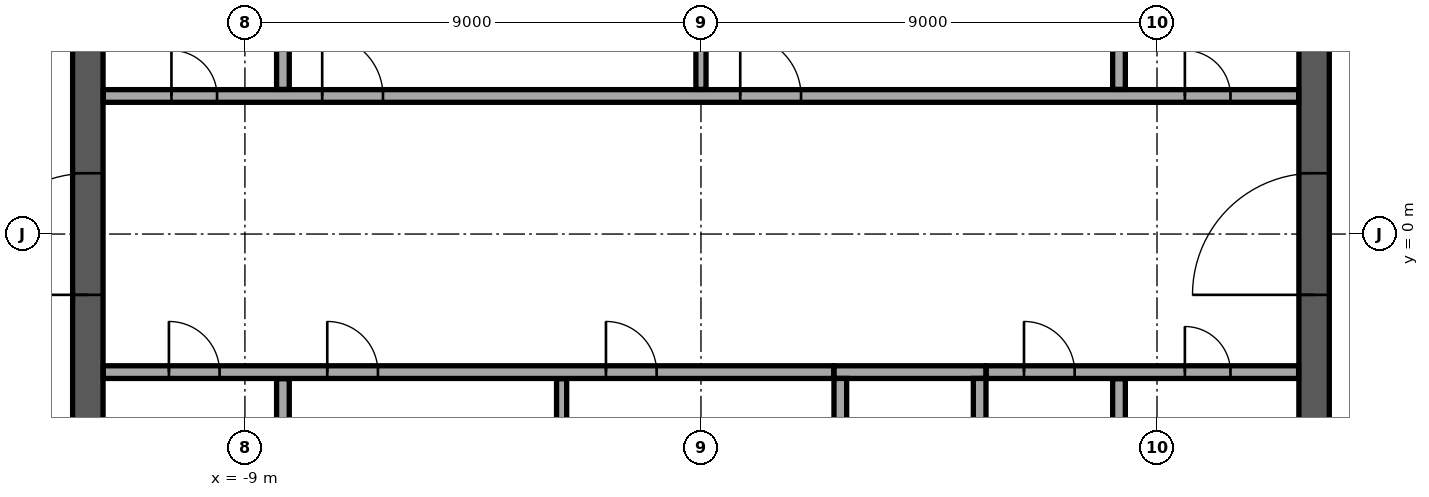
"""IFC4 building model, lengths in metres.
Left out: names, types, materials, properties, quantities, classifications, styles, units other than length and angle.
Written with IfcOpenShell. Run it as: python <this file> out.ifc"""

import sys

from ifc_helpers import new_model, si_unit, direction, frame, frame_2d, origin, place, context, subcontext, project, spatial, rectangle, extrude, element, fill, save


model = new_model("IFC4")
c1 = context("Model", 3, precision=1e-05, world=origin(), true_north=direction((0.0, 1.0)))
c2 = subcontext(c1, "Body", "Model", "MODEL_VIEW")
j1 = project(units=[si_unit("LENGTHUNIT", "METRE"), si_unit("PLANEANGLEUNIT", "RADIAN")], contexts=[c1])
p1 = place(None, origin())
s1 = spatial("IfcSite", under=j1, at=p1, CompositionType="ELEMENT")
p2 = place(p1, origin())
s2 = spatial("IfcBuilding", under=s1, at=p2, CompositionType="ELEMENT")
p3 = place(p2, frame((0.0, 0.0, 358.1)))
s3 = spatial("IfcBuildingStorey", under=s2, at=p3, CompositionType="ELEMENT", Elevation=358.1)
p4 = place(p3, frame((12.1, -11.8, 0.0), z_axis=(0.0, 0.0, 1.0), x_axis=(0.0, 1.0, 0.0)))
e1 = element("IfcWall", 1, at=p4, inside=s3, PredefinedType="SHEAR", context=c2, shape_type="SweptSolid", body=[
    extrude(rectangle(XDim=23.6, YDim=0.6, at=frame_2d((11.8, 0.0))), origin(), (0.0, 0.0, 1.0), 4.7),
])
p5 = place(p4, frame((10.6, 0.0, 0.0)))
e2 = element("IfcOpeningElement", 2, at=p5, cuts=e1, PredefinedType="OPENING", context=c2, shape_type="SweptSolid", body=[
    extrude(rectangle(XDim=2.4, YDim=2.4, at=frame_2d((1.2, 1.2))), frame((0.0, 0.31, 0.0), z_axis=(0.0, -1.0, 0.0), x_axis=(1.0, 0.0, 0.0)), (0.0, 0.0, 1.0), 0.62),
])
p6 = place(p3, frame((-12.1, -11.8, 0.0), z_axis=(0.0, 0.0, 1.0), x_axis=(0.0, 1.0, 0.0)))
e3 = element("IfcWall", 3, at=p6, inside=s3, PredefinedType="SHEAR", context=c2, shape_type="SweptSolid", body=[
    extrude(rectangle(XDim=23.6, YDim=0.6, at=frame_2d((11.8, 0.0))), origin(), (0.0, 0.0, 1.0), 4.7),
])
p7 = place(p6, frame((10.6, 0.0, 0.0)))
e4 = element("IfcOpeningElement", 4, at=p7, cuts=e3, PredefinedType="OPENING", context=c2, shape_type="SweptSolid", body=[
    extrude(rectangle(XDim=2.4, YDim=2.4, at=frame_2d((1.2, 1.2))), frame((0.0, 0.31, 0.0), z_axis=(0.0, -1.0, 0.0), x_axis=(1.0, 0.0, 0.0)), (0.0, 0.0, 1.0), 0.62),
])
p8 = place(p3, frame((2.625, -2.725, 0.0), z_axis=(0.0, 0.0, 1.0), x_axis=(1.0, 0.0, 0.0)))
e5 = element("IfcWall", 5, at=p8, inside=s3, PredefinedType="SOLIDWALL", context=c2, shape_type="SweptSolid", body=[
    extrude(rectangle(XDim=3.0, YDim=0.25, at=frame_2d((1.5, 0.0))), origin(), (0.0, 0.0, 1.0), 4.7),
])
for number, where, z_axis, x_axis in (
    (6, (2.75, -5.55, 0.0), (0.0, 0.0, 1.0), (0.0, 1.0, 0.0)),
    (7, (5.5, -5.55, 0.0), (0.0, 0.0, 1.0), (0.0, 1.0, 0.0)),
):
    element("IfcWall", number, at=place(p3, frame(where, z_axis=z_axis, x_axis=x_axis)), inside=s3, PredefinedType="SOLIDWALL", context=c2, shape_type="SweptSolid", body=[
        extrude(rectangle(XDim=2.7, YDim=0.25, at=frame_2d((1.35, 0.0))), origin(), (0.0, 0.0, 1.0), 4.7),
    ])
p9 = place(p3, frame((-8.25, -5.545, 0.0), z_axis=(0.0, 0.0, 1.0), x_axis=(0.0, 1.0, 0.0)))
e8 = element("IfcWall", 8, at=p9, inside=s3, PredefinedType="PARTITIONING", context=c2, shape_type="SweptSolid", body=[
    extrude(rectangle(XDim=2.69, YDim=0.25, at=frame_2d((1.345, 0.0))), origin(), (0.0, 0.0, 1.0), 4.7),
])
p10 = place(p3, frame((-2.75, -5.545, 0.0), z_axis=(0.0, 0.0, 1.0), x_axis=(0.0, 1.0, 0.0)))
e9 = element("IfcWall", 9, at=p10, inside=s3, PredefinedType="PARTITIONING", context=c2, shape_type="SweptSolid", body=[
    extrude(rectangle(XDim=2.69, YDim=0.2, at=frame_2d((1.345, 0.0))), origin(), (0.0, 0.0, 1.0), 4.7),
])
p11 = place(p3, frame((8.25, -5.545, 0.0), z_axis=(0.0, 0.0, 1.0), x_axis=(0.0, 1.0, 0.0)))
e10 = element("IfcWall", 10, at=p11, inside=s3, PredefinedType="PARTITIONING", context=c2, shape_type="SweptSolid", body=[
    extrude(rectangle(XDim=2.69, YDim=0.25, at=frame_2d((1.345, 0.0))), origin(), (0.0, 0.0, 1.0), 4.7),
])
p12 = place(p3, frame((-11.795, -2.725, 0.0), z_axis=(0.0, 0.0, 1.0), x_axis=(1.0, 0.0, 0.0)))
e11 = element("IfcWall", 11, at=p12, inside=s3, PredefinedType="PARTITIONING", context=c2, shape_type="SweptSolid", body=[
    extrude(rectangle(XDim=14.415, YDim=0.25, at=frame_2d((7.208, 0.0))), origin(), (0.0, 0.0, 1.0), 4.7),
])
p13 = place(p12, frame((1.295, 0.0, 0.0)))
e12 = element("IfcOpeningElement", 12, at=p13, cuts=e11, PredefinedType="OPENING", context=c2, shape_type="SweptSolid", body=[
    extrude(rectangle(XDim=1.0, YDim=2.1, at=frame_2d((0.5, 1.05))), frame((0.0, 0.135, 0.0), z_axis=(0.0, -1.0, 0.0), x_axis=(1.0, 0.0, 0.0)), (0.0, 0.0, 1.0), 0.27),
])
p14 = place(p12, frame((4.42, 0.0, 0.0)))
e13 = element("IfcOpeningElement", 13, at=p14, cuts=e11, PredefinedType="OPENING", context=c2, shape_type="SweptSolid", body=[
    extrude(rectangle(XDim=1.0, YDim=2.1, at=frame_2d((0.5, 1.05))), frame((0.0, 0.135, 0.0), z_axis=(0.0, -1.0, 0.0), x_axis=(1.0, 0.0, 0.0)), (0.0, 0.0, 1.0), 0.27),
])
p15 = place(p12, frame((9.92, 0.0, 0.0)))
e14 = element("IfcOpeningElement", 14, at=p15, cuts=e11, PredefinedType="OPENING", context=c2, shape_type="SweptSolid", body=[
    extrude(rectangle(XDim=1.0, YDim=2.1, at=frame_2d((0.5, 1.05))), frame((0.0, 0.135, 0.0), z_axis=(0.0, -1.0, 0.0), x_axis=(1.0, 0.0, 0.0)), (0.0, 0.0, 1.0), 0.27),
])
p16 = place(p3, frame((5.63, -2.725, 0.0), z_axis=(0.0, 0.0, 1.0), x_axis=(1.0, 0.0, 0.0)))
e15 = element("IfcWall", 15, at=p16, inside=s3, PredefinedType="PARTITIONING", context=c2, shape_type="SweptSolid", body=[
    extrude(rectangle(XDim=6.165, YDim=0.25, at=frame_2d((3.083, 0.0))), origin(), (0.0, 0.0, 1.0), 4.7),
])
p17 = place(p16, frame((0.745, 0.0, 0.0)))
e16 = element("IfcOpeningElement", 16, at=p17, cuts=e15, PredefinedType="OPENING", context=c2, shape_type="SweptSolid", body=[
    extrude(rectangle(XDim=1.0, YDim=2.1, at=frame_2d((0.5, 1.05))), frame((0.0, 0.135, 0.0), z_axis=(0.0, -1.0, 0.0), x_axis=(1.0, 0.0, 0.0)), (0.0, 0.0, 1.0), 0.27),
])
p18 = place(p16, frame((3.92, 0.0, 0.0)))
e17 = element("IfcOpeningElement", 17, at=p18, cuts=e15, PredefinedType="OPENING", context=c2, shape_type="SweptSolid", body=[
    extrude(rectangle(XDim=0.9, YDim=2.1, at=frame_2d((0.45, 1.05))), frame((0.0, 0.135, 0.0), z_axis=(0.0, -1.0, 0.0), x_axis=(1.0, 0.0, 0.0)), (0.0, 0.0, 1.0), 0.27),
])
p19 = place(p3, frame((-11.795, 2.725, 0.0), z_axis=(0.0, 0.0, 1.0), x_axis=(1.0, 0.0, 0.0)))
e18 = element("IfcWall", 18, at=p19, inside=s3, PredefinedType="PARTITIONING", context=c2, shape_type="SweptSolid", body=[
    extrude(rectangle(XDim=23.59, YDim=0.25, at=frame_2d((11.795, 0.0))), origin(), (0.0, 0.0, 1.0), 4.7),
])
p20 = place(p19, frame((21.345, 0.0, 0.0)))
e19 = element("IfcOpeningElement", 19, at=p20, cuts=e18, PredefinedType="OPENING", context=c2, shape_type="SweptSolid", body=[
    extrude(rectangle(XDim=0.9, YDim=2.1, at=frame_2d((0.45, 1.05))), frame((0.0, 0.135, 0.0), z_axis=(0.0, -1.0, 0.0), x_axis=(1.0, 0.0, 0.0)), (0.0, 0.0, 1.0), 0.27),
])
p21 = place(p19, frame((1.345, 0.0, 0.0)))
e20 = element("IfcOpeningElement", 20, at=p21, cuts=e18, PredefinedType="OPENING", context=c2, shape_type="SweptSolid", body=[
    extrude(rectangle(XDim=0.9, YDim=2.1, at=frame_2d((0.45, 1.05))), frame((0.0, 0.135, 0.0), z_axis=(0.0, -1.0, 0.0), x_axis=(1.0, 0.0, 0.0)), (0.0, 0.0, 1.0), 0.27),
])
p22 = place(p19, frame((4.32, 0.0, 0.0)))
e21 = element("IfcOpeningElement", 21, at=p22, cuts=e18, PredefinedType="OPENING", context=c2, shape_type="SweptSolid", body=[
    extrude(rectangle(XDim=1.2, YDim=2.1, at=frame_2d((0.6, 1.05))), frame((0.0, 0.135, 0.0), z_axis=(0.0, -1.0, 0.0), x_axis=(1.0, 0.0, 0.0)), (0.0, 0.0, 1.0), 0.27),
])
p23 = place(p19, frame((12.57, 0.0, 0.0)))
e22 = element("IfcOpeningElement", 22, at=p23, cuts=e18, PredefinedType="OPENING", context=c2, shape_type="SweptSolid", body=[
    extrude(rectangle(XDim=1.2, YDim=2.1, at=frame_2d((0.6, 1.05))), frame((0.0, 0.135, 0.0), z_axis=(0.0, -1.0, 0.0), x_axis=(1.0, 0.0, 0.0)), (0.0, 0.0, 1.0), 0.27),
])
p24 = place(p3, frame((-8.25, 2.855, 0.0), z_axis=(0.0, 0.0, 1.0), x_axis=(0.0, 1.0, 0.0)))
e23 = element("IfcWall", 23, at=p24, inside=s3, PredefinedType="PARTITIONING", context=c2, shape_type="SweptSolid", body=[
    extrude(rectangle(XDim=1.715, YDim=0.25, at=frame_2d((0.857, 0.0))), origin(), (0.0, 0.0, 1.0), 4.7),
])
p25 = place(p3, frame((0.0, 2.855, 0.0), z_axis=(0.0, 0.0, 1.0), x_axis=(0.0, 1.0, 0.0)))
e24 = element("IfcWall", 24, at=p25, inside=s3, PredefinedType="PARTITIONING", context=c2, shape_type="SweptSolid", body=[
    extrude(rectangle(XDim=2.69, YDim=0.2, at=frame_2d((1.345, 0.0))), origin(), (0.0, 0.0, 1.0), 4.7),
])
p26 = place(p3, frame((8.25, 2.855, 0.0), z_axis=(0.0, 0.0, 1.0), x_axis=(0.0, 1.0, 0.0)))
e25 = element("IfcWall", 25, at=p26, inside=s3, PredefinedType="PARTITIONING", context=c2, shape_type="SweptSolid", body=[
    extrude(rectangle(XDim=2.69, YDim=0.25, at=frame_2d((1.345, 0.0))), origin(), (0.0, 0.0, 1.0), 4.7),
])
p27 = place(p5, origin())
e26 = element("IfcDoor", 26, at=p27, inside=s3, OperationType="SINGLE_SWING_LEFT", PredefinedType="DOOR", context=c2, shape_type="SweptSolid", body=[
    extrude(rectangle(XDim=2.4, YDim=2.4, at=frame_2d((1.2, 1.2))), frame((0.0, 0.025, 0.0), z_axis=(0.0, -1.0, 0.0), x_axis=(1.0, 0.0, 0.0)), (0.0, 0.0, 1.0), 0.05),
])
fill(e2, e26)
p28 = place(p7, origin())
e27 = element("IfcDoor", 27, at=p28, inside=s3, OperationType="SINGLE_SWING_LEFT", PredefinedType="DOOR", context=c2, shape_type="SweptSolid", body=[
    extrude(rectangle(XDim=2.4, YDim=2.4, at=frame_2d((1.2, 1.2))), frame((0.0, 0.025, 0.0), z_axis=(0.0, -1.0, 0.0), x_axis=(1.0, 0.0, 0.0)), (0.0, 0.0, 1.0), 0.05),
])
fill(e4, e27)
p29 = place(p13, origin())
e28 = element("IfcDoor", 28, at=p29, inside=s3, OperationType="SINGLE_SWING_LEFT", PredefinedType="DOOR", context=c2, shape_type="SweptSolid", body=[
    extrude(rectangle(XDim=1.0, YDim=2.1, at=frame_2d((0.5, 1.05))), frame((0.0, 0.025, 0.0), z_axis=(0.0, -1.0, 0.0), x_axis=(1.0, 0.0, 0.0)), (0.0, 0.0, 1.0), 0.05),
])
fill(e12, e28)
p30 = place(p17, origin())
e29 = element("IfcDoor", 29, at=p30, inside=s3, OperationType="SINGLE_SWING_LEFT", PredefinedType="DOOR", context=c2, shape_type="SweptSolid", body=[
    extrude(rectangle(XDim=1.0, YDim=2.1, at=frame_2d((0.5, 1.05))), frame((0.0, 0.025, 0.0), z_axis=(0.0, -1.0, 0.0), x_axis=(1.0, 0.0, 0.0)), (0.0, 0.0, 1.0), 0.05),
])
fill(e16, e29)
p31 = place(p20, origin())
e30 = element("IfcDoor", 30, at=p31, inside=s3, OperationType="SINGLE_SWING_LEFT", PredefinedType="DOOR", context=c2, shape_type="SweptSolid", body=[
    extrude(rectangle(XDim=0.9, YDim=2.1, at=frame_2d((0.45, 1.05))), frame((0.0, 0.025, 0.0), z_axis=(0.0, -1.0, 0.0), x_axis=(1.0, 0.0, 0.0)), (0.0, 0.0, 1.0), 0.05),
])
fill(e19, e30)
p32 = place(p18, origin())
e31 = element("IfcDoor", 31, at=p32, inside=s3, OperationType="SINGLE_SWING_LEFT", PredefinedType="DOOR", context=c2, shape_type="SweptSolid", body=[
    extrude(rectangle(XDim=0.9, YDim=2.1, at=frame_2d((0.45, 1.05))), frame((0.0, 0.025, 0.0), z_axis=(0.0, -1.0, 0.0), x_axis=(1.0, 0.0, 0.0)), (0.0, 0.0, 1.0), 0.05),
])
fill(e17, e31)
p33 = place(p21, origin())
e32 = element("IfcDoor", 32, at=p33, inside=s3, OperationType="SINGLE_SWING_LEFT", PredefinedType="DOOR", context=c2, shape_type="SweptSolid", body=[
    extrude(rectangle(XDim=0.9, YDim=2.1, at=frame_2d((0.45, 1.05))), frame((0.0, 0.025, 0.0), z_axis=(0.0, -1.0, 0.0), x_axis=(1.0, 0.0, 0.0)), (0.0, 0.0, 1.0), 0.05),
])
fill(e20, e32)
p34 = place(p22, origin())
e33 = element("IfcDoor", 33, at=p34, inside=s3, OperationType="SINGLE_SWING_LEFT", PredefinedType="DOOR", context=c2, shape_type="SweptSolid", body=[
    extrude(rectangle(XDim=1.2, YDim=2.1, at=frame_2d((0.6, 1.05))), frame((0.0, 0.025, 0.0), z_axis=(0.0, -1.0, 0.0), x_axis=(1.0, 0.0, 0.0)), (0.0, 0.0, 1.0), 0.05),
])
fill(e21, e33)
p35 = place(p23, origin())
e34 = element("IfcDoor", 34, at=p35, inside=s3, OperationType="SINGLE_SWING_LEFT", PredefinedType="DOOR", context=c2, shape_type="SweptSolid", body=[
    extrude(rectangle(XDim=1.2, YDim=2.1, at=frame_2d((0.6, 1.05))), frame((0.0, 0.025, 0.0), z_axis=(0.0, -1.0, 0.0), x_axis=(1.0, 0.0, 0.0)), (0.0, 0.0, 1.0), 0.05),
])
fill(e22, e34)
p36 = place(p14, origin())
e35 = element("IfcDoor", 35, at=p36, inside=s3, OperationType="SINGLE_SWING_LEFT", PredefinedType="DOOR", context=c2, shape_type="SweptSolid", body=[
    extrude(rectangle(XDim=1.0, YDim=2.1, at=frame_2d((0.5, 1.05))), frame((0.0, 0.025, 0.0), z_axis=(0.0, -1.0, 0.0), x_axis=(1.0, 0.0, 0.0)), (0.0, 0.0, 1.0), 0.05),
])
fill(e13, e35)
p37 = place(p15, origin())
e36 = element("IfcDoor", 36, at=p37, inside=s3, OperationType="SINGLE_SWING_LEFT", PredefinedType="DOOR", context=c2, shape_type="SweptSolid", body=[
    extrude(rectangle(XDim=1.0, YDim=2.1, at=frame_2d((0.5, 1.05))), frame((0.0, 0.025, 0.0), z_axis=(0.0, -1.0, 0.0), x_axis=(1.0, 0.0, 0.0)), (0.0, 0.0, 1.0), 0.05),
])
fill(e14, e36)
save(model, sys.argv[1])
